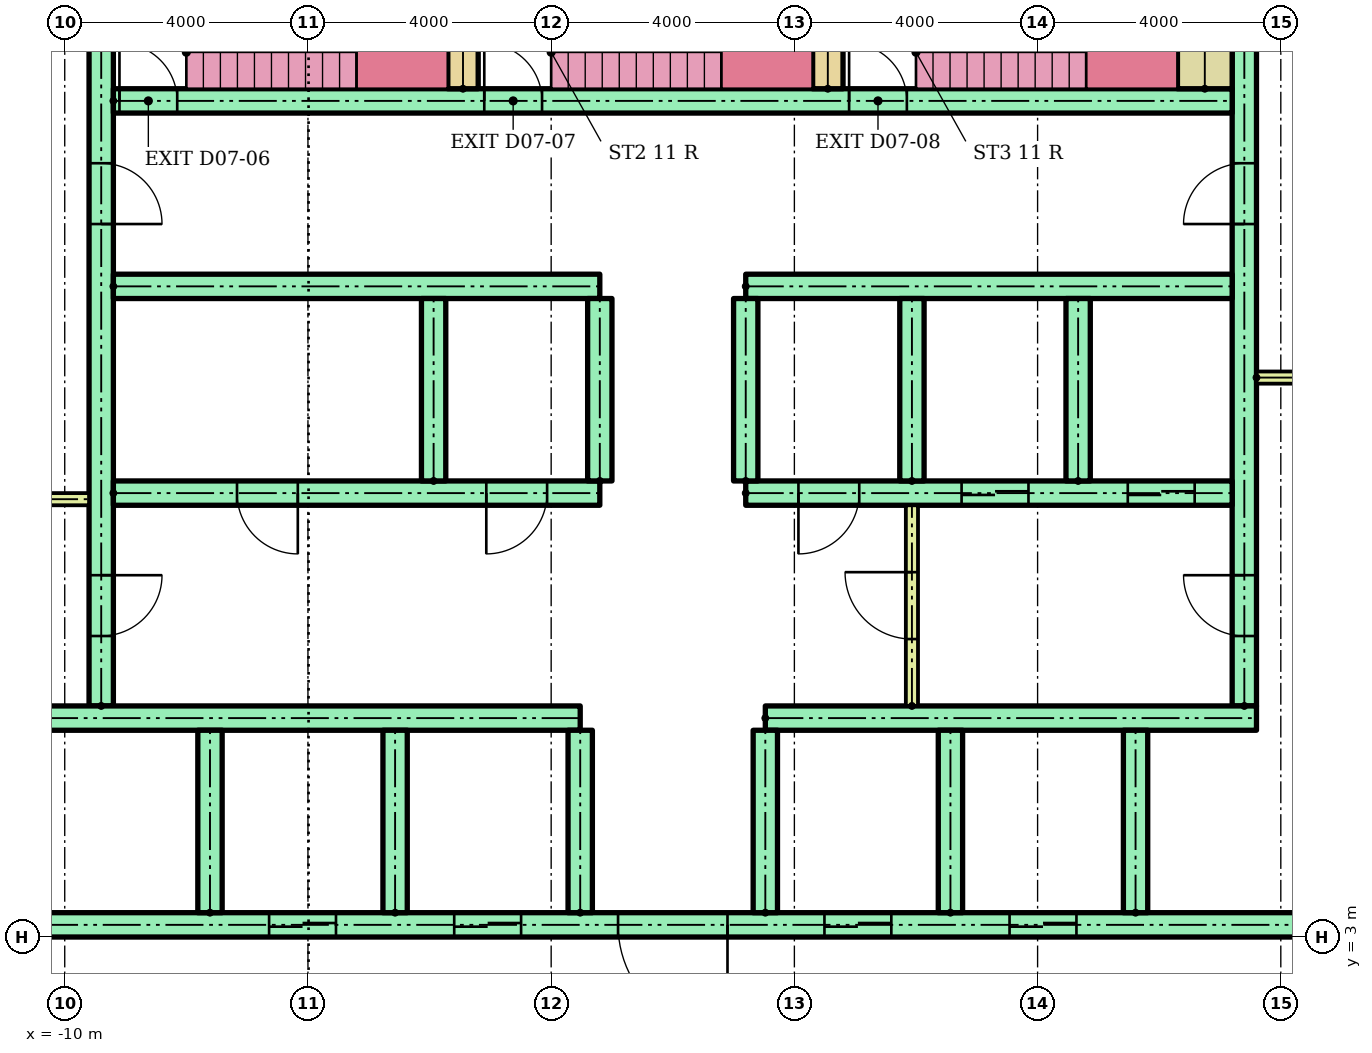
"""IFC4 building model, lengths in metres.
Left out: names, types, materials, properties, quantities, classifications, styles, units other than length and angle.
Written with IfcOpenShell. Run it as: python <this file> out.ifc"""

import sys

from ifc_helpers import new_model, si_unit, direction, frame, frame_2d, origin, place, context, subcontext, project, spatial, rectangle, extrude, element, fill, save


model = new_model("IFC4")
c1 = context("Model", 3, precision=1e-05, world=origin(), true_north=direction((0.0, 1.0)))
c2 = subcontext(c1, "Body", "Model", "MODEL_VIEW")
j1 = project(units=[si_unit("LENGTHUNIT", "METRE"), si_unit("PLANEANGLEUNIT", "RADIAN")], contexts=[c1])
p1 = place(None, origin())
s1 = spatial("IfcSite", under=j1, at=p1, CompositionType="ELEMENT")
p2 = place(p1, origin())
s2 = spatial("IfcBuilding", under=s1, at=p2, CompositionType="ELEMENT")
p3 = place(p2, frame((0.0, 0.0, 29.9)))
s3 = spatial("IfcBuildingStorey", under=s2, at=p3, CompositionType="ELEMENT", Elevation=29.9)
p4 = place(p3, frame((-9.4, 6.8, 0.0), z_axis=(0.0, 0.0, 1.0), x_axis=(0.0, 1.0, 0.0)))
e1 = element("IfcWall", 1, at=p4, inside=s3, PredefinedType="SHEAR", context=c2, shape_type="SweptSolid", body=[
    extrude(rectangle(XDim=12.7, YDim=0.4, at=frame_2d((6.35, 0.0))), origin(), (0.0, 0.0, 1.0), 3.6),
])
p5 = place(p4, frame((1.15, 0.0, 0.0)))
e2 = element("IfcOpeningElement", 2, at=p5, cuts=e1, PredefinedType="OPENING", context=c2, shape_type="SweptSolid", body=[
    extrude(rectangle(XDim=1.0, YDim=2.1, at=frame_2d((0.5, 1.05))), frame((0.0, 0.21, 0.0), z_axis=(0.0, -1.0, 0.0), x_axis=(1.0, 0.0, 0.0)), (0.0, 0.0, 1.0), 0.42),
])
p6 = place(p4, frame((7.925, 0.0, 0.0)))
e3 = element("IfcOpeningElement", 3, at=p6, cuts=e1, PredefinedType="OPENING", context=c2, shape_type="SweptSolid", body=[
    extrude(rectangle(XDim=1.0, YDim=2.1, at=frame_2d((0.5, 1.05))), frame((0.0, 0.21, 0.0), z_axis=(0.0, -1.0, 0.0), x_axis=(1.0, 0.0, 0.0)), (0.0, 0.0, 1.0), 0.42),
])
p7 = place(p3, frame((9.4, 6.8, 0.0), z_axis=(0.0, 0.0, 1.0), x_axis=(0.0, 1.0, 0.0)))
e4 = element("IfcWall", 4, at=p7, inside=s3, PredefinedType="SHEAR", context=c2, shape_type="SweptSolid", body=[
    extrude(rectangle(XDim=12.7, YDim=0.4, at=frame_2d((6.35, 0.0))), origin(), (0.0, 0.0, 1.0), 3.6),
])
p8 = place(p7, frame((1.15, 0.0, 0.0)))
e5 = element("IfcOpeningElement", 5, at=p8, cuts=e4, PredefinedType="OPENING", context=c2, shape_type="SweptSolid", body=[
    extrude(rectangle(XDim=1.0, YDim=2.1, at=frame_2d((0.5, 1.05))), frame((0.0, 0.21, 0.0), z_axis=(0.0, -1.0, 0.0), x_axis=(1.0, 0.0, 0.0)), (0.0, 0.0, 1.0), 0.42),
])
p9 = place(p7, frame((7.925, 0.0, 0.0)))
e6 = element("IfcOpeningElement", 6, at=p9, cuts=e4, PredefinedType="OPENING", context=c2, shape_type="SweptSolid", body=[
    extrude(rectangle(XDim=1.0, YDim=2.1, at=frame_2d((0.5, 1.05))), frame((0.0, 0.21, 0.0), z_axis=(0.0, -1.0, 0.0), x_axis=(1.0, 0.0, 0.0)), (0.0, 0.0, 1.0), 0.42),
])
p10 = place(p3, frame((-13.5, 3.2, 0.0)))
e7 = element("IfcWall", 7, at=p10, inside=s3, PredefinedType="SHEAR", context=c2, shape_type="SweptSolid", body=[
    extrude(rectangle(XDim=27.0, YDim=0.4, at=frame_2d((13.5, 0.0))), origin(), (0.0, 0.0, 1.0), 3.6),
])
p11 = place(p10, frame((6.861, 0.0, 0.0)))
e8 = element("IfcOpeningElement", 8, at=p11, cuts=e7, PredefinedType="OPENING", context=c2, shape_type="SweptSolid", body=[
    extrude(rectangle(XDim=1.1, YDim=2.1, at=frame_2d((0.55, 1.05))), frame((0.0, 0.21, 0.0), z_axis=(0.0, -1.0, 0.0), x_axis=(1.0, 0.0, 0.0)), (0.0, 0.0, 1.0), 0.42),
])
p12 = place(p10, frame((9.906, 0.0, 0.0)))
e9 = element("IfcOpeningElement", 9, at=p12, cuts=e7, PredefinedType="OPENING", context=c2, shape_type="SweptSolid", body=[
    extrude(rectangle(XDim=1.1, YDim=2.1, at=frame_2d((0.55, 1.05))), frame((0.0, 0.21, 0.0), z_axis=(0.0, -1.0, 0.0), x_axis=(1.0, 0.0, 0.0)), (0.0, 0.0, 1.0), 0.42),
])
p13 = place(p10, frame((15.994, 0.0, 0.0)))
e10 = element("IfcOpeningElement", 10, at=p13, cuts=e7, PredefinedType="OPENING", context=c2, shape_type="SweptSolid", body=[
    extrude(rectangle(XDim=1.1, YDim=2.1, at=frame_2d((0.55, 1.05))), frame((0.0, 0.21, 0.0), z_axis=(0.0, -1.0, 0.0), x_axis=(1.0, 0.0, 0.0)), (0.0, 0.0, 1.0), 0.42),
])
p14 = place(p10, frame((19.039, 0.0, 0.0)))
e11 = element("IfcOpeningElement", 11, at=p14, cuts=e7, PredefinedType="OPENING", context=c2, shape_type="SweptSolid", body=[
    extrude(rectangle(XDim=1.1, YDim=2.1, at=frame_2d((0.55, 1.05))), frame((0.0, 0.21, 0.0), z_axis=(0.0, -1.0, 0.0), x_axis=(1.0, 0.0, 0.0)), (0.0, 0.0, 1.0), 0.42),
])
p15 = place(p10, frame((12.6, 0.0, 0.0)))
e12 = element("IfcOpeningElement", 12, at=p15, cuts=e7, PredefinedType="OPENING", context=c2, shape_type="SweptSolid", body=[
    extrude(rectangle(XDim=1.8, YDim=2.1, at=frame_2d((0.9, 1.05))), frame((0.0, 0.21, 0.0), z_axis=(0.0, -1.0, 0.0), x_axis=(1.0, 0.0, 0.0)), (0.0, 0.0, 1.0), 0.42),
])
p16 = place(p3, frame((-13.5, 6.6, 0.0)))
e13 = element("IfcWall", 13, at=p16, inside=s3, PredefinedType="SHEAR", context=c2, shape_type="SweptSolid", body=[
    extrude(rectangle(XDim=11.978, YDim=0.4, at=frame_2d((5.989, 0.0))), origin(), (0.0, 0.0, 1.0), 3.6),
])
p17 = place(p3, frame((1.522, 6.6, 0.0)))
e14 = element("IfcWall", 14, at=p17, inside=s3, PredefinedType="SHEAR", context=c2, shape_type="SweptSolid", body=[
    extrude(rectangle(XDim=8.078, YDim=0.4, at=frame_2d((4.039, 0.0))), origin(), (0.0, 0.0, 1.0), 3.6),
])
for number, where, z_axis, x_axis in (
    (15, (-7.611, 3.4, 0.0), (0.0, 0.0, 1.0), (0.0, 1.0, 0.0)),
    (16, (-4.567, 3.4, 0.0), (0.0, 0.0, 1.0), (0.0, 1.0, 0.0)),
    (17, (-1.522, 3.4, 0.0), (0.0, 0.0, 1.0), (0.0, 1.0, 0.0)),
    (18, (1.522, 3.4, 0.0), (0.0, 0.0, 1.0), (0.0, 1.0, 0.0)),
    (19, (4.567, 3.4, 0.0), (0.0, 0.0, 1.0), (0.0, 1.0, 0.0)),
    (20, (7.611, 3.4, 0.0), (0.0, 0.0, 1.0), (0.0, 1.0, 0.0)),
):
    element("IfcWall", number, at=place(p3, frame(where, z_axis=z_axis, x_axis=x_axis)), inside=s3, PredefinedType="SHEAR", context=c2, shape_type="SweptSolid", body=[
        extrude(rectangle(XDim=3.0, YDim=0.4, at=frame_2d((1.5, 0.0))), origin(), (0.0, 0.0, 1.0), 3.6),
    ])
p18 = place(p3, frame((-9.2, 10.3, 0.0)))
e21 = element("IfcWall", 21, at=p18, inside=s3, PredefinedType="SHEAR", context=c2, shape_type="SweptSolid", body=[
    extrude(rectangle(XDim=8.0, YDim=0.4, at=frame_2d((4.0, 0.0))), origin(), (0.0, 0.0, 1.0), 3.6),
])
p19 = place(p18, frame((2.033, 0.0, 0.0)))
e22 = element("IfcOpeningElement", 22, at=p19, cuts=e21, PredefinedType="OPENING", context=c2, shape_type="SweptSolid", body=[
    extrude(rectangle(XDim=1.0, YDim=2.1, at=frame_2d((0.5, 1.05))), frame((0.0, 0.21, 0.0), z_axis=(0.0, -1.0, 0.0), x_axis=(1.0, 0.0, 0.0)), (0.0, 0.0, 1.0), 0.42),
])
p20 = place(p18, frame((6.133, 0.0, 0.0)))
e23 = element("IfcOpeningElement", 23, at=p20, cuts=e21, PredefinedType="OPENING", context=c2, shape_type="SweptSolid", body=[
    extrude(rectangle(XDim=1.0, YDim=2.1, at=frame_2d((0.5, 1.05))), frame((0.0, 0.21, 0.0), z_axis=(0.0, -1.0, 0.0), x_axis=(1.0, 0.0, 0.0)), (0.0, 0.0, 1.0), 0.42),
])
p21 = place(p3, frame((-9.2, 13.7, 0.0)))
e24 = element("IfcWall", 24, at=p21, inside=s3, PredefinedType="SHEAR", context=c2, shape_type="SweptSolid", body=[
    extrude(rectangle(XDim=8.0, YDim=0.4, at=frame_2d((4.0, 0.0))), origin(), (0.0, 0.0, 1.0), 3.6),
])
p22 = place(p3, frame((1.2, 10.3, 0.0)))
e25 = element("IfcWall", 25, at=p22, inside=s3, PredefinedType="SHEAR", context=c2, shape_type="SweptSolid", body=[
    extrude(rectangle(XDim=8.0, YDim=0.4, at=frame_2d((4.0, 0.0))), origin(), (0.0, 0.0, 1.0), 3.6),
])
p23 = place(p22, frame((3.55, 0.0, 0.0)))
e26 = element("IfcOpeningElement", 26, at=p23, cuts=e25, PredefinedType="OPENING", context=c2, shape_type="SweptSolid", body=[
    extrude(rectangle(XDim=1.1, YDim=2.1, at=frame_2d((0.55, 1.05))), frame((0.0, 0.21, 0.0), z_axis=(0.0, -1.0, 0.0), x_axis=(1.0, 0.0, 0.0)), (0.0, 0.0, 1.0), 0.42),
])
p24 = place(p22, frame((6.283, 0.0, 0.0)))
e27 = element("IfcOpeningElement", 27, at=p24, cuts=e25, PredefinedType="OPENING", context=c2, shape_type="SweptSolid", body=[
    extrude(rectangle(XDim=1.1, YDim=2.1, at=frame_2d((0.55, 1.05))), frame((0.0, 0.21, 0.0), z_axis=(0.0, -1.0, 0.0), x_axis=(1.0, 0.0, 0.0)), (0.0, 0.0, 1.0), 0.42),
])
p25 = place(p22, frame((0.867, 0.0, 0.0)))
e28 = element("IfcOpeningElement", 28, at=p25, cuts=e25, PredefinedType="OPENING", context=c2, shape_type="SweptSolid", body=[
    extrude(rectangle(XDim=1.0, YDim=2.1, at=frame_2d((0.5, 1.05))), frame((0.0, 0.21, 0.0), z_axis=(0.0, -1.0, 0.0), x_axis=(1.0, 0.0, 0.0)), (0.0, 0.0, 1.0), 0.42),
])
p26 = place(p3, frame((1.2, 13.7, 0.0)))
e29 = element("IfcWall", 29, at=p26, inside=s3, PredefinedType="SHEAR", context=c2, shape_type="SweptSolid", body=[
    extrude(rectangle(XDim=8.0, YDim=0.4, at=frame_2d((4.0, 0.0))), origin(), (0.0, 0.0, 1.0), 3.6),
])
for number, where, z_axis, x_axis in (
    (30, (-3.933, 10.5, 0.0), (0.0, 0.0, 1.0), (0.0, 1.0, 0.0)),
    (31, (-1.2, 10.5, 0.0), (0.0, 0.0, 1.0), (0.0, 1.0, 0.0)),
    (32, (1.2, 10.5, 0.0), (0.0, 0.0, 1.0), (0.0, 1.0, 0.0)),
    (33, (3.933, 10.5, 0.0), (0.0, 0.0, 1.0), (0.0, 1.0, 0.0)),
    (34, (6.667, 10.5, 0.0), (0.0, 0.0, 1.0), (0.0, 1.0, 0.0)),
):
    element("IfcWall", number, at=place(p3, frame(where, z_axis=z_axis, x_axis=x_axis)), inside=s3, PredefinedType="SHEAR", context=c2, shape_type="SweptSolid", body=[
        extrude(rectangle(XDim=3.0, YDim=0.4, at=frame_2d((1.5, 0.0))), origin(), (0.0, 0.0, 1.0), 3.6),
    ])
p27 = place(p3, frame((3.933, 6.8, 0.0), z_axis=(0.0, 0.0, 1.0), x_axis=(0.0, 1.0, 0.0)))
e35 = element("IfcWall", 35, at=p27, inside=s3, PredefinedType="PARTITIONING", context=c2, shape_type="SweptSolid", body=[
    extrude(rectangle(XDim=3.3, YDim=0.2, at=frame_2d((1.65, 0.0))), origin(), (0.0, 0.0, 1.0), 3.6),
])
p28 = place(p27, frame((1.1, 0.0, 0.0)))
e36 = element("IfcOpeningElement", 36, at=p28, cuts=e35, PredefinedType="OPENING", context=c2, shape_type="SweptSolid", body=[
    extrude(rectangle(XDim=1.1, YDim=2.1, at=frame_2d((0.55, 1.05))), frame((0.0, 0.11, 0.0), z_axis=(0.0, -1.0, 0.0), x_axis=(1.0, 0.0, 0.0)), (0.0, 0.0, 1.0), 0.22),
])
p29 = place(p3, frame((-9.2, 16.75, 0.0)))
e37 = element("IfcWall", 37, at=p29, inside=s3, PredefinedType="SHEAR", context=c2, shape_type="SweptSolid", body=[
    extrude(rectangle(XDim=18.4, YDim=0.4, at=frame_2d((9.2, 0.0))), origin(), (0.0, 0.0, 1.0), 3.6),
])
p30 = place(p29, frame((0.1, 0.0, 0.0)))
e38 = element("IfcOpeningElement", 38, at=p30, cuts=e37, PredefinedType="OPENING", context=c2, shape_type="SweptSolid", body=[
    extrude(rectangle(XDim=0.95, YDim=2.1, at=frame_2d((0.475, 1.05))), frame((0.0, 0.21, 0.0), z_axis=(0.0, -1.0, 0.0), x_axis=(1.0, 0.0, 0.0)), (0.0, 0.0, 1.0), 0.42),
])
p31 = place(p29, frame((6.1, 0.0, 0.0)))
e39 = element("IfcOpeningElement", 39, at=p31, cuts=e37, PredefinedType="OPENING", context=c2, shape_type="SweptSolid", body=[
    extrude(rectangle(XDim=0.95, YDim=2.1, at=frame_2d((0.475, 1.05))), frame((0.0, 0.21, 0.0), z_axis=(0.0, -1.0, 0.0), x_axis=(1.0, 0.0, 0.0)), (0.0, 0.0, 1.0), 0.42),
])
p32 = place(p29, frame((12.1, 0.0, 0.0)))
e40 = element("IfcOpeningElement", 40, at=p32, cuts=e37, PredefinedType="OPENING", context=c2, shape_type="SweptSolid", body=[
    extrude(rectangle(XDim=0.95, YDim=2.1, at=frame_2d((0.475, 1.05))), frame((0.0, 0.21, 0.0), z_axis=(0.0, -1.0, 0.0), x_axis=(1.0, 0.0, 0.0)), (0.0, 0.0, 1.0), 0.42),
])
for number, where, z_axis, x_axis in (
    (41, (-3.45, 16.95, 0.0), (0.0, 0.0, 1.0), (0.0, 1.0, 0.0)),
    (42, (2.55, 16.95, 0.0), (0.0, 0.0, 1.0), (0.0, 1.0, 0.0)),
):
    element("IfcWall", number, at=place(p3, frame(where, z_axis=z_axis, x_axis=x_axis)), inside=s3, PredefinedType="SHEAR", context=c2, shape_type="SweptSolid", body=[
        extrude(rectangle(XDim=2.55, YDim=0.5, at=frame_2d((1.275, 0.0))), origin(), (0.0, 0.0, 1.0), 3.6),
    ])
p33 = place(p3, frame((8.75, 16.95, 0.0), z_axis=(0.0, 0.0, 1.0), x_axis=(0.0, 1.0, 0.0)))
e43 = element("IfcWall", 43, at=p33, inside=s3, PredefinedType="SHEAR", context=c2, shape_type="SweptSolid", body=[
    extrude(rectangle(XDim=2.55, YDim=0.9, at=frame_2d((1.275, 0.0))), origin(), (0.0, 0.0, 1.0), 3.6),
])
for number, where in (
    (44, (-13.5, 10.2, 0.0)),
    (45, (9.6, 12.2, 0.0)),
):
    element("IfcWall", number, at=place(p3, frame(where)), inside=s3, PredefinedType="PARTITIONING", context=c2, shape_type="SweptSolid", body=[
        extrude(rectangle(XDim=3.9, YDim=0.2, at=frame_2d((1.95, 0.0))), origin(), (0.0, 0.0, 1.0), 3.6),
    ])
p34 = place(p11, origin())
e46 = element("IfcDoor", 46, at=p34, inside=s3, OperationType="SLIDING_TO_LEFT", PredefinedType="DOOR", context=c2, shape_type="SweptSolid", body=[
    extrude(rectangle(XDim=1.1, YDim=2.1, at=frame_2d((0.55, 1.05))), frame((0.0, 0.025, 0.0), z_axis=(0.0, -1.0, 0.0), x_axis=(1.0, 0.0, 0.0)), (0.0, 0.0, 1.0), 0.05),
])
fill(e8, e46)
p35 = place(p12, origin())
e47 = element("IfcDoor", 47, at=p35, inside=s3, OperationType="SLIDING_TO_LEFT", PredefinedType="DOOR", context=c2, shape_type="SweptSolid", body=[
    extrude(rectangle(XDim=1.1, YDim=2.1, at=frame_2d((0.55, 1.05))), frame((0.0, 0.025, 0.0), z_axis=(0.0, -1.0, 0.0), x_axis=(1.0, 0.0, 0.0)), (0.0, 0.0, 1.0), 0.05),
])
fill(e9, e47)
p36 = place(p13, origin())
e48 = element("IfcDoor", 48, at=p36, inside=s3, OperationType="SLIDING_TO_LEFT", PredefinedType="DOOR", context=c2, shape_type="SweptSolid", body=[
    extrude(rectangle(XDim=1.1, YDim=2.1, at=frame_2d((0.55, 1.05))), frame((0.0, 0.025, 0.0), z_axis=(0.0, -1.0, 0.0), x_axis=(1.0, 0.0, 0.0)), (0.0, 0.0, 1.0), 0.05),
])
fill(e10, e48)
p37 = place(p14, origin())
e49 = element("IfcDoor", 49, at=p37, inside=s3, OperationType="SLIDING_TO_LEFT", PredefinedType="DOOR", context=c2, shape_type="SweptSolid", body=[
    extrude(rectangle(XDim=1.1, YDim=2.1, at=frame_2d((0.55, 1.05))), frame((0.0, 0.025, 0.0), z_axis=(0.0, -1.0, 0.0), x_axis=(1.0, 0.0, 0.0)), (0.0, 0.0, 1.0), 0.05),
])
fill(e11, e49)
p38 = place(p15, frame((1.8, 0.0, 0.0), z_axis=(0.0, 0.0, 1.0), x_axis=(-1.0, 0.0, 0.0)))
e50 = element("IfcDoor", 50, at=p38, inside=s3, OperationType="DOUBLE_DOOR_SINGLE_SWING", PredefinedType="DOOR", context=c2, shape_type="SweptSolid", body=[
    extrude(rectangle(XDim=1.8, YDim=2.1, at=frame_2d((0.9, 1.05))), frame((0.0, 0.025, 0.0), z_axis=(0.0, -1.0, 0.0), x_axis=(1.0, 0.0, 0.0)), (0.0, 0.0, 1.0), 0.05),
])
fill(e12, e50)
p39 = place(p23, origin())
e51 = element("IfcDoor", 51, at=p39, inside=s3, OperationType="SLIDING_TO_LEFT", PredefinedType="DOOR", context=c2, shape_type="SweptSolid", body=[
    extrude(rectangle(XDim=1.1, YDim=2.1, at=frame_2d((0.55, 1.05))), frame((0.0, 0.025, 0.0), z_axis=(0.0, -1.0, 0.0), x_axis=(1.0, 0.0, 0.0)), (0.0, 0.0, 1.0), 0.05),
])
fill(e26, e51)
p40 = place(p24, origin())
e52 = element("IfcDoor", 52, at=p40, inside=s3, OperationType="SLIDING_TO_LEFT", PredefinedType="DOOR", context=c2, shape_type="SweptSolid", body=[
    extrude(rectangle(XDim=1.1, YDim=2.1, at=frame_2d((0.55, 1.05))), frame((0.0, 0.025, 0.0), z_axis=(0.0, -1.0, 0.0), x_axis=(1.0, 0.0, 0.0)), (0.0, 0.0, 1.0), 0.05),
])
fill(e27, e52)
p41 = place(p19, frame((1.0, 0.0, 0.0), z_axis=(0.0, 0.0, 1.0), x_axis=(-1.0, 0.0, 0.0)))
e53 = element("IfcDoor", 53, at=p41, inside=s3, OperationType="SINGLE_SWING_RIGHT", PredefinedType="DOOR", context=c2, shape_type="SweptSolid", body=[
    extrude(rectangle(XDim=1.0, YDim=2.1, at=frame_2d((0.5, 1.05))), frame((0.0, 0.025, 0.0), z_axis=(0.0, -1.0, 0.0), x_axis=(1.0, 0.0, 0.0)), (0.0, 0.0, 1.0), 0.05),
])
fill(e22, e53)
p42 = place(p20, frame((1.0, 0.0, 0.0), z_axis=(0.0, 0.0, 1.0), x_axis=(-1.0, 0.0, 0.0)))
e54 = element("IfcDoor", 54, at=p42, inside=s3, OperationType="SINGLE_SWING_LEFT", PredefinedType="DOOR", context=c2, shape_type="SweptSolid", body=[
    extrude(rectangle(XDim=1.0, YDim=2.1, at=frame_2d((0.5, 1.05))), frame((0.0, 0.025, 0.0), z_axis=(0.0, -1.0, 0.0), x_axis=(1.0, 0.0, 0.0)), (0.0, 0.0, 1.0), 0.05),
])
fill(e23, e54)
p43 = place(p25, frame((1.0, 0.0, 0.0), z_axis=(0.0, 0.0, 1.0), x_axis=(-1.0, 0.0, 0.0)))
e55 = element("IfcDoor", 55, at=p43, inside=s3, OperationType="SINGLE_SWING_LEFT", PredefinedType="DOOR", context=c2, shape_type="SweptSolid", body=[
    extrude(rectangle(XDim=1.0, YDim=2.1, at=frame_2d((0.5, 1.05))), frame((0.0, 0.025, 0.0), z_axis=(0.0, -1.0, 0.0), x_axis=(1.0, 0.0, 0.0)), (0.0, 0.0, 1.0), 0.05),
])
fill(e28, e55)
p44 = place(p28, origin())
e56 = element("IfcDoor", 56, at=p44, inside=s3, OperationType="SINGLE_SWING_RIGHT", PredefinedType="DOOR", context=c2, shape_type="SweptSolid", body=[
    extrude(rectangle(XDim=1.1, YDim=2.1, at=frame_2d((0.55, 1.05))), frame((0.0, 0.025, 0.0), z_axis=(0.0, -1.0, 0.0), x_axis=(1.0, 0.0, 0.0)), (0.0, 0.0, 1.0), 0.05),
])
fill(e36, e56)
p45 = place(p30, origin())
e57 = element("IfcDoor", 57, at=p45, inside=s3, OperationType="SINGLE_SWING_LEFT", PredefinedType="DOOR", context=c2, shape_type="SweptSolid", body=[
    extrude(rectangle(XDim=0.95, YDim=2.1, at=frame_2d((0.475, 1.05))), frame((0.0, 0.025, 0.0), z_axis=(0.0, -1.0, 0.0), x_axis=(1.0, 0.0, 0.0)), (0.0, 0.0, 1.0), 0.05),
])
fill(e38, e57)
p46 = place(p31, origin())
e58 = element("IfcDoor", 58, at=p46, inside=s3, OperationType="SINGLE_SWING_LEFT", PredefinedType="DOOR", context=c2, shape_type="SweptSolid", body=[
    extrude(rectangle(XDim=0.95, YDim=2.1, at=frame_2d((0.475, 1.05))), frame((0.0, 0.025, 0.0), z_axis=(0.0, -1.0, 0.0), x_axis=(1.0, 0.0, 0.0)), (0.0, 0.0, 1.0), 0.05),
])
fill(e39, e58)
p47 = place(p32, origin())
e59 = element("IfcDoor", 59, at=p47, inside=s3, OperationType="SINGLE_SWING_LEFT", PredefinedType="DOOR", context=c2, shape_type="SweptSolid", body=[
    extrude(rectangle(XDim=0.95, YDim=2.1, at=frame_2d((0.475, 1.05))), frame((0.0, 0.025, 0.0), z_axis=(0.0, -1.0, 0.0), x_axis=(1.0, 0.0, 0.0)), (0.0, 0.0, 1.0), 0.05),
])
fill(e40, e59)
p48 = place(p5, frame((1.0, 0.0, 0.0), z_axis=(0.0, 0.0, 1.0), x_axis=(-1.0, 0.0, 0.0)))
e60 = element("IfcDoor", 60, at=p48, inside=s3, OperationType="SINGLE_SWING_RIGHT", PredefinedType="DOOR", context=c2, shape_type="SweptSolid", body=[
    extrude(rectangle(XDim=1.0, YDim=2.1, at=frame_2d((0.5, 1.05))), frame((0.0, 0.025, 0.0), z_axis=(0.0, -1.0, 0.0), x_axis=(1.0, 0.0, 0.0)), (0.0, 0.0, 1.0), 0.05),
])
fill(e2, e60)
p49 = place(p6, frame((1.0, 0.0, 0.0), z_axis=(0.0, 0.0, 1.0), x_axis=(-1.0, 0.0, 0.0)))
e61 = element("IfcDoor", 61, at=p49, inside=s3, OperationType="SINGLE_SWING_LEFT", PredefinedType="DOOR", context=c2, shape_type="SweptSolid", body=[
    extrude(rectangle(XDim=1.0, YDim=2.1, at=frame_2d((0.5, 1.05))), frame((0.0, 0.025, 0.0), z_axis=(0.0, -1.0, 0.0), x_axis=(1.0, 0.0, 0.0)), (0.0, 0.0, 1.0), 0.05),
])
fill(e3, e61)
p50 = place(p8, origin())
e62 = element("IfcDoor", 62, at=p50, inside=s3, OperationType="SINGLE_SWING_RIGHT", PredefinedType="DOOR", context=c2, shape_type="SweptSolid", body=[
    extrude(rectangle(XDim=1.0, YDim=2.1, at=frame_2d((0.5, 1.05))), frame((0.0, 0.025, 0.0), z_axis=(0.0, -1.0, 0.0), x_axis=(1.0, 0.0, 0.0)), (0.0, 0.0, 1.0), 0.05),
])
fill(e5, e62)
p51 = place(p9, origin())
e63 = element("IfcDoor", 63, at=p51, inside=s3, OperationType="SINGLE_SWING_LEFT", PredefinedType="DOOR", context=c2, shape_type="SweptSolid", body=[
    extrude(rectangle(XDim=1.0, YDim=2.1, at=frame_2d((0.5, 1.05))), frame((0.0, 0.025, 0.0), z_axis=(0.0, -1.0, 0.0), x_axis=(1.0, 0.0, 0.0)), (0.0, 0.0, 1.0), 0.05),
])
fill(e6, e63)
save(model, sys.argv[1])
